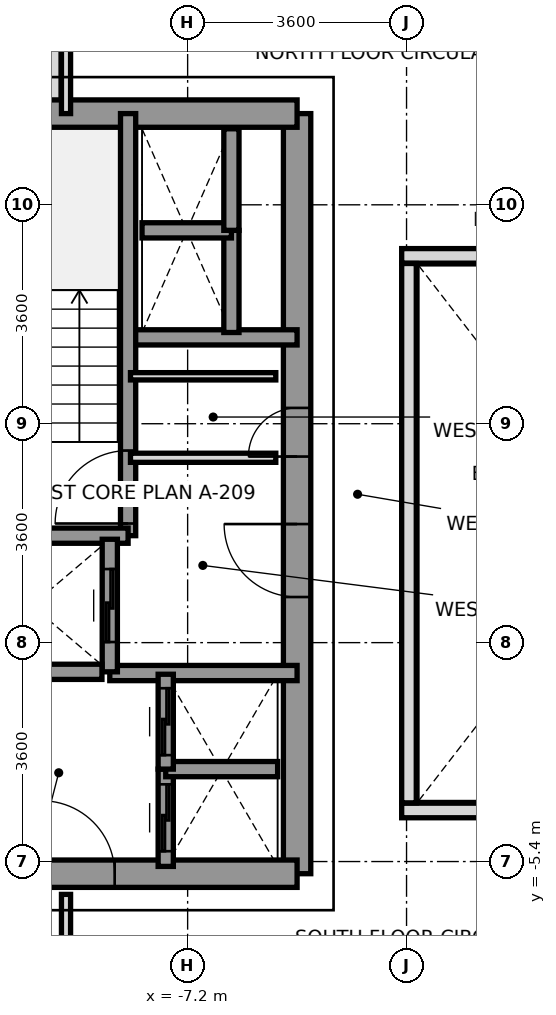
"""IFC4 building model, lengths in metres.
Left out: names, types, materials, properties, quantities, classifications, styles, units other than length and angle.
Written with IfcOpenShell. Run it as: python <this file> out.ifc"""

import sys

from ifc_helpers import new_model, si_unit, direction, frame, frame_2d, origin, place, context, subcontext, project, spatial, rectangle, extrude, source, transform, mapped, element, fill, save


model = new_model("IFC4")
c1 = context("Model", 3, precision=1e-05, world=origin(), true_north=direction((0.0, 1.0)))
c2 = subcontext(c1, "Body", "Model", "MODEL_VIEW")
j1 = project(units=[si_unit("LENGTHUNIT", "METRE"), si_unit("PLANEANGLEUNIT", "RADIAN")], contexts=[c1])
p1 = place(None, origin())
s1 = spatial("IfcSite", under=j1, at=p1, CompositionType="ELEMENT")
p2 = place(p1, origin())
s2 = spatial("IfcBuilding", under=s1, at=p2, CompositionType="ELEMENT")
p3 = place(p2, frame((0.0, 0.0, 127.8)))
s3 = spatial("IfcBuildingStorey", under=s2, at=p3, CompositionType="ELEMENT", Elevation=127.8)
p4 = place(p3, frame((-9.4, 6.953, 0.0), z_axis=(0.0, 0.0, 1.0), x_axis=(0.0, 1.0, 0.0)))
e1 = element("IfcWall", 1, at=p4, inside=s3, PredefinedType="PARAPET", context=c2, shape_type="SweptSolid", body=[
    extrude(rectangle(XDim=1.519, YDim=0.24, at=frame_2d((0.76, 0.0))), origin(), (0.0, 0.0, 1.0), 1.15),
])
p5 = place(p3, frame((-5.4, -5.6, 0.0), z_axis=(0.0, 0.0, 1.0), x_axis=(0.0, 1.0, 0.0)))
e2 = element("IfcWall", 2, at=p5, inside=s3, PredefinedType="SHEAR", context=c2, shape_type="SweptSolid", body=[
    extrude(rectangle(XDim=12.5, YDim=0.45, at=frame_2d((6.25, 0.0))), origin(), (0.0, 0.0, 1.0), 3.2),
])
p6 = place(p5, frame((4.55, 0.0, 0.0)))
e3 = element("IfcOpeningElement", 3, at=p6, cuts=e2, PredefinedType="OPENING", context=c2, shape_type="SweptSolid", body=[
    extrude(rectangle(XDim=1.2, YDim=2.2, at=frame_2d((0.6, 1.1))), frame((0.0, 0.235, 0.0), z_axis=(0.0, -1.0, 0.0), x_axis=(1.0, 0.0, 0.0)), (0.0, 0.0, 1.0), 0.47),
])
p7 = place(p5, frame((6.86, 0.0, 0.0)))
e4 = element("IfcOpeningElement", 4, at=p7, cuts=e2, PredefinedType="OPENING", context=c2, shape_type="SweptSolid", body=[
    extrude(rectangle(XDim=0.8, YDim=2.1, at=frame_2d((0.4, 1.05))), frame((0.0, 0.235, 0.0), z_axis=(0.0, -1.0, 0.0), x_axis=(1.0, 0.0, 0.0)), (0.0, 0.0, 1.0), 0.47),
])
p8 = place(p3, frame((-11.381, 6.9, 0.0), z_axis=(0.0, 0.0, 1.0), x_axis=(1.0, 0.0, 0.0)))
e5 = element("IfcWall", 5, at=p8, inside=s3, PredefinedType="SHEAR", context=c2, shape_type="SweptSolid", body=[
    extrude(rectangle(XDim=5.981, YDim=0.45, at=frame_2d((2.991, 0.0))), origin(), (0.0, 0.0, 1.0), 3.2),
])
p9 = place(p3, frame((-13.2, -5.6, 0.0), z_axis=(0.0, 0.0, 1.0), x_axis=(1.0, 0.0, 0.0)))
e6 = element("IfcWall", 6, at=p9, inside=s3, PredefinedType="SHEAR", context=c2, shape_type="SweptSolid", body=[
    extrude(rectangle(XDim=7.8, YDim=0.45, at=frame_2d((3.9, 0.0))), origin(), (0.0, 0.0, 1.0), 3.2),
])
p10 = place(p9, frame((3.6, 0.0, 0.0)))
e7 = element("IfcOpeningElement", 7, at=p10, cuts=e6, PredefinedType="OPENING", context=c2, shape_type="SweptSolid", body=[
    extrude(rectangle(XDim=1.2, YDim=2.2, at=frame_2d((0.6, 1.1))), frame((0.0, 0.235, 0.0), z_axis=(0.0, -1.0, 0.0), x_axis=(1.0, 0.0, 0.0)), (0.0, 0.0, 1.0), 0.47),
])
p11 = place(p9, frame((0.28, 0.0, 0.0)))
e8 = element("IfcOpeningElement", 8, at=p11, cuts=e6, PredefinedType="OPENING", context=c2, shape_type="SweptSolid", body=[
    extrude(rectangle(XDim=0.85, YDim=2.1, at=frame_2d((0.425, 1.05))), frame((0.0, 0.235, 0.0), z_axis=(0.0, -1.0, 0.0), x_axis=(1.0, 0.0, 0.0)), (0.0, 0.0, 1.0), 0.47),
])
p12 = place(p9, frame((1.36, 0.0, 0.0)))
e9 = element("IfcOpeningElement", 9, at=p12, cuts=e6, PredefinedType="OPENING", context=c2, shape_type="SweptSolid", body=[
    extrude(rectangle(XDim=0.85, YDim=2.1, at=frame_2d((0.425, 1.05))), frame((0.0, 0.235, 0.0), z_axis=(0.0, -1.0, 0.0), x_axis=(1.0, 0.0, 0.0)), (0.0, 0.0, 1.0), 0.47),
])
p13 = place(p3, frame((-8.18, 3.22, 0.0), z_axis=(0.0, 0.0, 1.0), x_axis=(1.0, 0.0, 0.0)))
e10 = element("IfcWall", 10, at=p13, inside=s3, PredefinedType="SOLIDWALL", context=c2, shape_type="SweptSolid", body=[
    extrude(rectangle(XDim=2.78, YDim=0.25, at=frame_2d((1.39, 0.0))), origin(), (0.0, 0.0, 1.0), 3.2),
])
p14 = place(p3, frame((-8.48, -2.3, 0.0), z_axis=(0.0, 0.0, 1.0), x_axis=(1.0, 0.0, 0.0)))
e11 = element("IfcWall", 11, at=p14, inside=s3, PredefinedType="SOLIDWALL", context=c2, shape_type="SweptSolid", body=[
    extrude(rectangle(XDim=3.08, YDim=0.25, at=frame_2d((1.54, 0.0))), origin(), (0.0, 0.0, 1.0), 3.2),
])
p15 = place(p3, frame((-8.179, -0.041, 0.0), z_axis=(0.0, 0.0, 1.0), x_axis=(0.0, 1.0, 0.0)))
e12 = element("IfcWall", 12, at=p15, inside=s3, PredefinedType="SOLIDWALL", context=c2, shape_type="SweptSolid", body=[
    extrude(rectangle(XDim=6.941, YDim=0.25, at=frame_2d((3.47, 0.0))), origin(), (0.0, 0.0, 1.0), 3.2),
])
p16 = place(p15, frame((0.2, 0.0, 0.0)))
e13 = element("IfcOpeningElement", 13, at=p16, cuts=e12, PredefinedType="OPENING", context=c2, shape_type="SweptSolid", body=[
    extrude(rectangle(XDim=1.2, YDim=2.2, at=frame_2d((0.6, 1.1))), frame((0.0, 0.135, 0.0), z_axis=(0.0, -1.0, 0.0), x_axis=(1.0, 0.0, 0.0)), (0.0, 0.0, 1.0), 0.27),
])
p17 = place(p3, frame((-11.381, -0.041, 0.0), z_axis=(0.0, 0.0, 1.0), x_axis=(1.0, 0.0, 0.0)))
e14 = element("IfcWall", 14, at=p17, inside=s3, PredefinedType="SOLIDWALL", context=c2, shape_type="SweptSolid", body=[
    extrude(rectangle(XDim=3.202, YDim=0.25, at=frame_2d((1.601, 0.0))), origin(), (0.0, 0.0, 1.0), 3.2),
])
p18 = place(p3, frame((-8.48, -2.28, 0.0), z_axis=(0.0, 0.0, 1.0), x_axis=(0.0, 1.0, 0.0)))
e15 = element("IfcWall", 15, at=p18, inside=s3, PredefinedType="SOLIDWALL", context=c2, shape_type="SweptSolid", body=[
    extrude(rectangle(XDim=2.18, YDim=0.25, at=frame_2d((1.09, 0.0))), origin(), (0.0, 0.0, 1.0), 3.2),
])
p19 = place(p18, frame((0.49, 0.0, 0.0)))
e16 = element("IfcOpeningElement", 16, at=p19, cuts=e15, PredefinedType="OPENING", context=c2, shape_type="SweptSolid", body=[
    extrude(rectangle(XDim=1.2, YDim=2.2, at=frame_2d((0.6, 1.1))), frame((0.0, 0.135, 0.0), z_axis=(0.0, -1.0, 0.0), x_axis=(1.0, 0.0, 0.0)), (0.0, 0.0, 1.0), 0.27),
])
p20 = place(p3, frame((-10.921, -2.28, 0.0), z_axis=(0.0, 0.0, 1.0), x_axis=(1.0, 0.0, 0.0)))
e17 = element("IfcWall", 17, at=p20, inside=s3, PredefinedType="SOLIDWALL", context=c2, shape_type="SweptSolid", body=[
    extrude(rectangle(XDim=2.312, YDim=0.25, at=frame_2d((1.156, 0.0))), origin(), (0.0, 0.0, 1.0), 3.2),
])
p21 = place(p3, frame((-7.56, -5.48, 0.0), z_axis=(0.0, 0.0, 1.0), x_axis=(0.0, 1.0, 0.0)))
e18 = element("IfcWall", 18, at=p21, inside=s3, PredefinedType="SOLIDWALL", context=c2, shape_type="SweptSolid", body=[
    extrude(rectangle(XDim=1.6, YDim=0.25, at=frame_2d((0.8, 0.0))), origin(), (0.0, 0.0, 1.0), 3.2),
])
p22 = place(p21, frame((0.25, 0.0, 0.0)))
e19 = element("IfcOpeningElement", 19, at=p22, cuts=e18, PredefinedType="OPENING", context=c2, shape_type="SweptSolid", body=[
    extrude(rectangle(XDim=1.1, YDim=2.2, at=frame_2d((0.55, 1.1))), frame((0.0, 0.135, 0.0), z_axis=(0.0, -1.0, 0.0), x_axis=(1.0, 0.0, 0.0)), (0.0, 0.0, 1.0), 0.27),
])
p23 = place(p3, frame((-7.56, -3.88, 0.0), z_axis=(0.0, 0.0, 1.0), x_axis=(1.0, 0.0, 0.0)))
e20 = element("IfcWall", 20, at=p23, inside=s3, PredefinedType="SOLIDWALL", context=c2, shape_type="SweptSolid", body=[
    extrude(rectangle(XDim=1.84, YDim=0.25, at=frame_2d((0.92, 0.0))), origin(), (0.0, 0.0, 1.0), 3.2),
])
p24 = place(p3, frame((-7.56, -3.88, 0.0), z_axis=(0.0, 0.0, 1.0), x_axis=(0.0, 1.0, 0.0)))
e21 = element("IfcWall", 21, at=p24, inside=s3, PredefinedType="SOLIDWALL", context=c2, shape_type="SweptSolid", body=[
    extrude(rectangle(XDim=1.56, YDim=0.25, at=frame_2d((0.78, 0.0))), origin(), (0.0, 0.0, 1.0), 3.2),
])
p25 = place(p24, frame((0.23, 0.0, 0.0)))
e22 = element("IfcOpeningElement", 22, at=p25, cuts=e21, PredefinedType="OPENING", context=c2, shape_type="SweptSolid", body=[
    extrude(rectangle(XDim=1.1, YDim=2.2, at=frame_2d((0.55, 1.1))), frame((0.0, 0.135, 0.0), z_axis=(0.0, -1.0, 0.0), x_axis=(1.0, 0.0, 0.0)), (0.0, 0.0, 1.0), 0.27),
])
p26 = place(p3, frame((-6.48, 3.3, 0.0), z_axis=(0.0, 0.0, 1.0), x_axis=(0.0, 1.0, 0.0)))
e23 = element("IfcWall", 23, at=p26, inside=s3, PredefinedType="SOLIDWALL", context=c2, shape_type="SweptSolid", body=[
    extrude(rectangle(XDim=1.68, YDim=0.25, at=frame_2d((0.84, 0.0))), origin(), (0.0, 0.0, 1.0), 3.2),
])
p27 = place(p3, frame((-7.95, 4.98, 0.0), z_axis=(0.0, 0.0, 1.0), x_axis=(1.0, 0.0, 0.0)))
e24 = element("IfcWall", 24, at=p27, inside=s3, PredefinedType="SOLIDWALL", context=c2, shape_type="SweptSolid", body=[
    extrude(rectangle(XDim=1.47, YDim=0.25, at=frame_2d((0.735, 0.0))), origin(), (0.0, 0.0, 1.0), 3.2),
])
p28 = place(p3, frame((-6.48, 4.98, 0.0), z_axis=(0.0, 0.0, 1.0), x_axis=(0.0, 1.0, 0.0)))
e25 = element("IfcWall", 25, at=p28, inside=s3, PredefinedType="SOLIDWALL", context=c2, shape_type="SweptSolid", body=[
    extrude(rectangle(XDim=1.67, YDim=0.25, at=frame_2d((0.835, 0.0))), origin(), (0.0, 0.0, 1.0), 3.2),
])
p29 = place(p3, frame((-8.14, 1.24, 0.0), z_axis=(0.0, 0.0, 1.0), x_axis=(1.0, 0.0, 0.0)))
e26 = element("IfcWall", 26, at=p29, inside=s3, PredefinedType="PARTITIONING", context=c2, shape_type="SweptSolid", body=[
    extrude(rectangle(XDim=2.39, YDim=0.15, at=frame_2d((1.195, 0.0))), origin(), (0.0, 0.0, 1.0), 2.3),
])
p30 = place(p3, frame((-8.14, 2.58, 0.0), z_axis=(0.0, 0.0, 1.0), x_axis=(1.0, 0.0, 0.0)))
e27 = element("IfcWall", 27, at=p30, inside=s3, PredefinedType="PARTITIONING", context=c2, shape_type="SweptSolid", body=[
    extrude(rectangle(XDim=2.39, YDim=0.12, at=frame_2d((1.195, 0.0))), origin(), (0.0, 0.0, 1.0), 2.3),
])
p31 = place(p3, frame((-9.2, 6.9, 0.0), z_axis=(0.0, 0.0, 1.0), x_axis=(0.0, 1.0, 0.0)))
e28 = element("IfcWall", 28, at=p31, inside=s3, PredefinedType="PARTITIONING", context=c2, shape_type="SweptSolid", body=[
    extrude(rectangle(XDim=8.78, YDim=0.15, at=frame_2d((4.39, 0.0))), origin(), (0.0, 0.0, 1.0), 2.7),
])
p32 = place(p3, frame((-9.2, -15.68, 0.0), z_axis=(0.0, 0.0, 1.0), x_axis=(0.0, 1.0, 0.0)))
e29 = element("IfcWall", 29, at=p32, inside=s3, PredefinedType="PARTITIONING", context=c2, shape_type="SweptSolid", body=[
    extrude(rectangle(XDim=9.74, YDim=0.15, at=frame_2d((4.87, 0.0))), origin(), (0.0, 0.0, 1.0), 2.7),
])
for number, where, z_axis, x_axis in (
    (30, (-3.68, -4.56, 0.0), (0.0, 0.0, 1.0), (1.0, 0.0, 0.0)),
    (31, (-3.68, 4.56, 0.0), (0.0, 0.0, 1.0), (1.0, 0.0, 0.0)),
):
    element("IfcWall", number, at=place(p3, frame(where, z_axis=z_axis, x_axis=x_axis)), inside=s3, PredefinedType="PARAPET", context=c2, shape_type="SweptSolid", body=[
        extrude(rectangle(XDim=7.36, YDim=0.24, at=frame_2d((3.68, 0.0))), origin(), (0.0, 0.0, 1.0), 1.15),
    ])
p33 = place(p3, frame((-3.56, -4.435, 0.0), z_axis=(0.0, 0.0, 1.0), x_axis=(0.0, 1.0, 0.0)))
e32 = element("IfcWall", 32, at=p33, inside=s3, PredefinedType="PARAPET", context=c2, shape_type="SweptSolid", body=[
    extrude(rectangle(XDim=8.87, YDim=0.24, at=frame_2d((4.435, 0.0))), origin(), (0.0, 0.0, 1.0), 1.15),
])
m1 = source(origin(), c2, "Body", "SweptSolid", [
    extrude(rectangle(XDim=1.2, YDim=2.2, at=frame_2d((0.6, 1.1))), frame((0.0, 0.025, 0.0), z_axis=(0.0, -1.0, 0.0), x_axis=(1.0, 0.0, 0.0)), (0.0, 0.0, 1.0), 0.05),
])
p34 = place(p16, origin())
e33 = element("IfcDoor", 33, at=p34, inside=s3, OperationType="SINGLE_SWING_LEFT", PredefinedType="DOOR", context=c2, shape_type="MappedRepresentation", body=[
    mapped(m1, transform((0.0, 0.0, 0.0), x_axis=(1.0, 0.0, 0.0), y_axis=(0.0, 1.0, 0.0), z_axis=(0.0, 0.0, 1.0), scale=1.0)),
])
fill(e13, e33)
p35 = place(p6, origin())
e34 = element("IfcDoor", 34, at=p35, inside=s3, OperationType="SINGLE_SWING_RIGHT", PredefinedType="DOOR", context=c2, shape_type="MappedRepresentation", body=[
    mapped(m1, transform((0.0, 0.0, 0.0), x_axis=(1.0, 0.0, 0.0), y_axis=(0.0, 1.0, 0.0), z_axis=(0.0, 0.0, 1.0), scale=1.0)),
])
fill(e3, e34)
p36 = place(p10, origin())
e35 = element("IfcDoor", 35, at=p36, inside=s3, OperationType="SINGLE_SWING_LEFT", PredefinedType="DOOR", context=c2, shape_type="MappedRepresentation", body=[
    mapped(m1, transform((0.0, 0.0, 0.0), x_axis=(1.0, 0.0, 0.0), y_axis=(0.0, 1.0, 0.0), z_axis=(0.0, 0.0, 1.0), scale=1.0)),
])
fill(e7, e35)
m2 = source(origin(), c2, "Body", "SweptSolid", [
    extrude(rectangle(XDim=0.8, YDim=2.1, at=frame_2d((0.4, 1.05))), frame((0.0, 0.025, 0.0), z_axis=(0.0, -1.0, 0.0), x_axis=(1.0, 0.0, 0.0)), (0.0, 0.0, 1.0), 0.05),
])
p37 = place(p7, origin())
e36 = element("IfcDoor", 36, at=p37, inside=s3, OperationType="SINGLE_SWING_LEFT", PredefinedType="DOOR", context=c2, shape_type="MappedRepresentation", body=[
    mapped(m2, transform((0.0, 0.0, 0.0), x_axis=(1.0, 0.0, 0.0), y_axis=(0.0, 1.0, 0.0), z_axis=(0.0, 0.0, 1.0), scale=1.0)),
])
fill(e4, e36)
p38 = place(p19, origin())
e37 = element("IfcDoor", 37, at=p38, inside=s3, OperationType="SLIDING_TO_RIGHT", PredefinedType="DOOR", context=c2, shape_type="MappedRepresentation", body=[
    mapped(m1, transform((0.0, 0.0, 0.0), x_axis=(1.0, 0.0, 0.0), y_axis=(0.0, 1.0, 0.0), z_axis=(0.0, 0.0, 1.0), scale=1.0)),
])
fill(e16, e37)
m3 = source(origin(), c2, "Body", "SweptSolid", [
    extrude(rectangle(XDim=1.1, YDim=2.2, at=frame_2d((0.55, 1.1))), frame((0.0, 0.025, 0.0), z_axis=(0.0, -1.0, 0.0), x_axis=(1.0, 0.0, 0.0)), (0.0, 0.0, 1.0), 0.05),
])
p39 = place(p22, origin())
e38 = element("IfcDoor", 38, at=p39, inside=s3, OperationType="SLIDING_TO_LEFT", PredefinedType="DOOR", context=c2, shape_type="MappedRepresentation", body=[
    mapped(m3, transform((0.0, 0.0, 0.0), x_axis=(1.0, 0.0, 0.0), y_axis=(0.0, 1.0, 0.0), z_axis=(0.0, 0.0, 1.0), scale=1.0)),
])
fill(e19, e38)
p40 = place(p25, origin())
e39 = element("IfcDoor", 39, at=p40, inside=s3, OperationType="SLIDING_TO_LEFT", PredefinedType="DOOR", context=c2, shape_type="MappedRepresentation", body=[
    mapped(m3, transform((0.0, 0.0, 0.0), x_axis=(1.0, 0.0, 0.0), y_axis=(0.0, 1.0, 0.0), z_axis=(0.0, 0.0, 1.0), scale=1.0)),
])
fill(e22, e39)
save(model, sys.argv[1])
